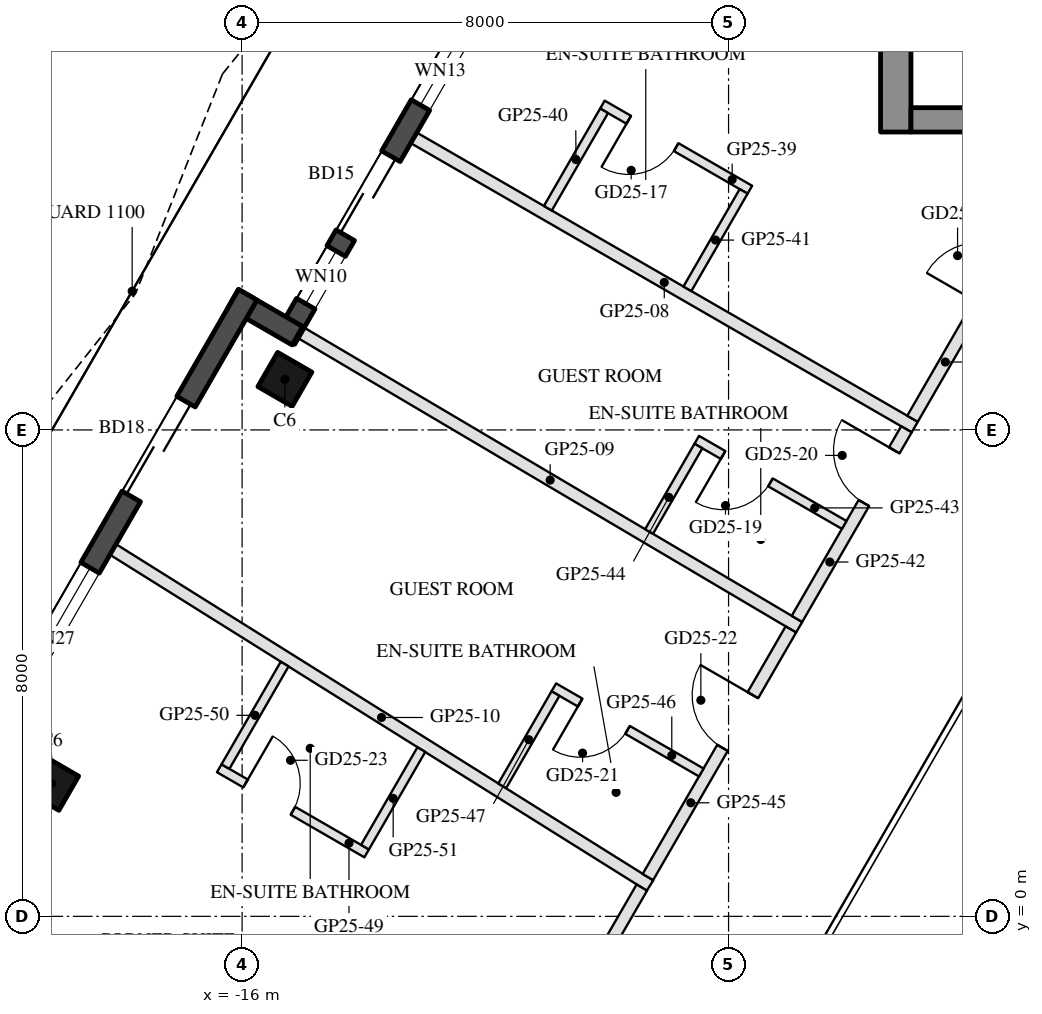
"""IFC4 building model, lengths in metres.
Left out: names, types, materials, properties, quantities, classifications, styles, units other than length and angle.
Written with IfcOpenShell. Run it as: python <this file> out.ifc"""

import sys

from ifc_helpers import new_model, si_unit, direction, frame, frame_2d, origin, origin_2d, place, context, subcontext, project, spatial, rectangle, hollow_rectangle, extrude, boolean, halfspace, element, fill, save


model = new_model("IFC4")
c1 = context("Model", 3, precision=1e-05, world=origin(), true_north=direction((0.0, 1.0)))
c2 = subcontext(c1, "Body", "Model", "MODEL_VIEW")
j1 = project(units=[si_unit("LENGTHUNIT", "METRE"), si_unit("PLANEANGLEUNIT", "RADIAN")], contexts=[c1])
p1 = place(None, origin())
s1 = spatial("IfcSite", under=j1, at=p1, CompositionType="ELEMENT")
p2 = place(p1, origin())
s2 = spatial("IfcBuilding", under=s1, at=p2, CompositionType="ELEMENT")
p3 = place(p2, frame((0.0, 0.0, 261.5)))
s3 = spatial("IfcBuildingStorey", under=s2, at=p3, CompositionType="ELEMENT", Elevation=261.5)
p4 = place(p3, frame((-15.296, 8.832, 0.0), z_axis=(0.0, 0.0, 1.0), x_axis=(0.5, 0.866025403784, 0.0)))
e1 = element("IfcColumn", 1, at=p4, inside=s3, PredefinedType="COLUMN", context=c2, shape_type="SweptSolid", body=[
    boolean("DIFFERENCE", extrude(hollow_rectangle(XDim=0.65, YDim=0.65, WallThickness=0.03, at=origin_2d()), origin(), (0.0, 0.0, 1.0), 3.7), halfspace(frame((0.0, 0.0, 3.663), z_axis=(0.0, 0.0, 1.0), x_axis=(1.0, 0.0, 0.0)), False)),
])
p5 = place(p3, frame((-19.132, 2.188, 0.0), z_axis=(0.0, 0.0, 1.0), x_axis=(0.5, 0.866025403784, 0.0)))
e2 = element("IfcColumn", 2, at=p5, inside=s3, PredefinedType="COLUMN", context=c2, shape_type="SweptSolid", body=[
    boolean("DIFFERENCE", extrude(hollow_rectangle(XDim=0.65, YDim=0.65, WallThickness=0.03, at=origin_2d()), origin(), (0.0, 0.0, 1.0), 3.7), halfspace(frame((0.0, 0.0, 3.66), z_axis=(0.0, 0.0, 1.0), x_axis=(1.0, 0.0, 0.0)), False)),
])
p6 = place(p3, frame((-12.032, 15.136, 0.0), z_axis=(0.0, 0.0, 1.0), x_axis=(-0.500005870429, -0.866022014464, 0.0)))
e3 = element("IfcWall", 3, at=p6, inside=s3, PredefinedType="SOLIDWALL", context=c2, shape_type="SweptSolid", body=[
    extrude(rectangle(XDim=6.512, YDim=0.35, at=frame_2d((3.256, 0.0))), origin(), (0.0, 0.0, 1.0), 3.55),
])
p7 = place(p6, frame((0.77, 0.0, 0.3)))
e4 = element("IfcOpeningElement", 4, at=p7, cuts=e3, PredefinedType="OPENING", context=c2, shape_type="SweptSolid", body=[
    extrude(rectangle(XDim=1.3, YDim=2.65, at=frame_2d((0.65, 1.325))), frame((0.0, 0.185, 0.0), z_axis=(0.0, -1.0, 0.0), x_axis=(1.0, 0.0, 0.0)), (0.0, 0.0, 1.0), 0.37),
])
p8 = place(p6, frame((3.042, 0.0, 0.0)))
e5 = element("IfcOpeningElement", 5, at=p8, cuts=e3, PredefinedType="OPENING", context=c2, shape_type="SweptSolid", body=[
    extrude(rectangle(XDim=1.5, YDim=2.4, at=frame_2d((0.75, 1.2))), frame((0.0, 0.185, 0.0), z_axis=(0.0, -1.0, 0.0), x_axis=(1.0, 0.0, 0.0)), (0.0, 0.0, 1.0), 0.37),
])
p9 = place(p6, frame((4.842, 0.0, 0.3)))
e6 = element("IfcOpeningElement", 6, at=p9, cuts=e3, PredefinedType="OPENING", context=c2, shape_type="SweptSolid", body=[
    extrude(rectangle(XDim=1.0, YDim=2.65, at=frame_2d((0.5, 1.325))), frame((0.0, 0.185, 0.0), z_axis=(0.0, -1.0, 0.0), x_axis=(1.0, 0.0, 0.0)), (0.0, 0.0, 1.0), 0.37),
])
p10 = place(p3, frame((-15.09, 9.549, 0.0), z_axis=(0.0, 0.0, 1.0), x_axis=(-0.866092288191, 0.499884134912, 0.0)))
e7 = element("IfcWall", 7, at=p10, inside=s3, PredefinedType="SOLIDWALL", context=c2, shape_type="SweptSolid", body=[
    extrude(rectangle(XDim=1.22, YDim=0.35, at=frame_2d((0.61, 0.0))), origin(), (0.0, 0.0, 1.0), 3.55),
])
p11 = place(p3, frame((-15.907, 10.223, 0.0), z_axis=(0.0, 0.0, 1.0), x_axis=(-0.499992427901, -0.866029775494, 0.0)))
e8 = element("IfcWall", 8, at=p11, inside=s3, PredefinedType="SOLIDWALL", context=c2, shape_type="SweptSolid", body=[
    extrude(rectangle(XDim=9.472, YDim=0.35, at=frame_2d((4.736, 0.0))), origin(), (0.0, 0.0, 1.0), 3.55),
])
p12 = place(p11, frame((2.03, 0.0, 0.0)))
e9 = element("IfcOpeningElement", 9, at=p12, cuts=e8, PredefinedType="OPENING", context=c2, shape_type="SweptSolid", body=[
    extrude(rectangle(XDim=1.8, YDim=2.4, at=frame_2d((0.9, 1.2))), frame((0.0, 0.185, 0.0), z_axis=(0.0, -1.0, 0.0), x_axis=(1.0, 0.0, 0.0)), (0.0, 0.0, 1.0), 0.37),
])
p13 = place(p11, frame((5.186, 0.0, 0.3)))
e10 = element("IfcOpeningElement", 10, at=p13, cuts=e8, PredefinedType="OPENING", context=c2, shape_type="SweptSolid", body=[
    extrude(rectangle(XDim=2.7, YDim=2.65, at=frame_2d((1.35, 1.325))), frame((0.0, 0.185, 0.0), z_axis=(0.0, -1.0, 0.0), x_axis=(1.0, 0.0, 0.0)), (0.0, 0.0, 1.0), 0.37),
])
p14 = place(p3, frame((-5.25, 12.9, 0.0), z_axis=(0.0, 0.0, 1.0), x_axis=(0.0, 1.0, 0.0)))
e11 = element("IfcWall", 11, at=p14, inside=s3, PredefinedType="SHEAR", context=c2, shape_type="SweptSolid", body=[
    extrude(rectangle(XDim=13.934, YDim=0.5, at=frame_2d((6.967, 0.0))), origin(), (0.0, 0.0, 1.0), 3.5),
])
p15 = place(p3, frame((5.0, 13.1, 0.0), z_axis=(0.0, 0.0, 1.0), x_axis=(-1.0, 0.0, 0.0)))
e12 = element("IfcWall", 12, at=p15, inside=s3, PredefinedType="SHEAR", context=c2, shape_type="SweptSolid", body=[
    extrude(rectangle(XDim=10.0, YDim=0.4, at=frame_2d((5.0, 0.0))), origin(), (0.0, 0.0, 1.0), 3.5),
])
p16 = place(p15, frame((3.55, 0.0, 0.0)))
e13 = element("IfcOpeningElement", 13, at=p16, cuts=e12, PredefinedType="OPENING", context=c2, shape_type="SweptSolid", body=[
    extrude(rectangle(XDim=1.1, YDim=2.1, at=frame_2d((0.55, 1.05))), frame((0.0, 0.21, 0.0), z_axis=(0.0, -1.0, 0.0), x_axis=(1.0, 0.0, 0.0)), (0.0, 0.0, 1.0), 0.42),
])
p17 = place(p15, frame((5.85, 0.0, 0.0)))
e14 = element("IfcOpeningElement", 14, at=p17, cuts=e12, PredefinedType="OPENING", context=c2, shape_type="SweptSolid", body=[
    extrude(rectangle(XDim=1.4, YDim=2.1, at=frame_2d((0.7, 1.05))), frame((0.0, 0.21, 0.0), z_axis=(0.0, -1.0, 0.0), x_axis=(1.0, 0.0, 0.0)), (0.0, 0.0, 1.0), 0.42),
])
p18 = place(p3, frame((-13.177, 12.804, 0.0), z_axis=(0.0, 0.0, 1.0), x_axis=(0.866021901412, -0.500006066238, 0.0)))
e15 = element("IfcWall", 15, at=p18, inside=s3, PredefinedType="PARTITIONING", context=c2, shape_type="SweptSolid", body=[
    extrude(rectangle(XDim=9.513, YDim=0.2, at=frame_2d((4.757, 0.0))), origin(), (0.0, 0.0, 1.0), 3.1),
])
p19 = place(p3, frame((-15.029, 9.596, 0.0), z_axis=(0.0, 0.0, 1.0), x_axis=(0.860830464323, -0.508891846754, 0.0)))
e16 = element("IfcWall", 16, at=p19, inside=s3, PredefinedType="PARTITIONING", context=c2, shape_type="SweptSolid", body=[
    extrude(rectangle(XDim=9.513, YDim=0.2, at=frame_2d((4.757, 0.0))), origin(), (0.0, 0.0, 1.0), 3.1),
])
p20 = place(p3, frame((-18.124, 6.034, 0.0), z_axis=(0.0, 0.0, 1.0), x_axis=(0.847667734063, -0.530527485271, 0.0)))
e17 = element("IfcWall", 17, at=p20, inside=s3, PredefinedType="PARTITIONING", context=c2, shape_type="SweptSolid", body=[
    extrude(rectangle(XDim=10.419, YDim=0.2, at=frame_2d((5.21, 0.0))), origin(), (0.0, 0.0, 1.0), 3.0),
])
p21 = place(p3, frame((-4.975, 8.184, 0.0), z_axis=(0.0, 0.0, 1.0), x_axis=(0.499983925036, 0.86603468447, 0.0)))
e18 = element("IfcWall", 18, at=p21, inside=s3, PredefinedType="PARTITIONING", context=c2, shape_type="SweptSolid", body=[
    extrude(rectangle(XDim=5.388, YDim=0.2, at=frame_2d((2.694, 0.0))), origin(), (0.0, 0.0, 1.0), 3.0),
])
p22 = place(p21, frame((2.194, 0.0, 0.0)))
e19 = element("IfcOpeningElement", 19, at=p22, cuts=e18, PredefinedType="OPENING", context=c2, shape_type="SweptSolid", body=[
    extrude(rectangle(XDim=1.0, YDim=2.1, at=frame_2d((0.5, 1.05))), frame((0.0, 0.11, 0.0), z_axis=(0.0, -1.0, 0.0), x_axis=(1.0, 0.0, 0.0)), (0.0, 0.0, 1.0), 0.22),
])
p23 = place(p3, frame((-7.649, 11.951, 0.0), z_axis=(0.0, 0.0, 1.0), x_axis=(-0.865996816683, 0.500049511043, 0.0)))
e20 = element("IfcWall", 20, at=p23, inside=s3, PredefinedType="PARTITIONING", context=c2, shape_type="SweptSolid", body=[
    extrude(rectangle(XDim=2.8, YDim=0.15, at=frame_2d((1.4, 0.0))), origin(), (0.0, 0.0, 1.0), 3.55),
])
p24 = place(p23, frame((1.4, 0.0, 0.0)))
e21 = element("IfcOpeningElement", 21, at=p24, cuts=e20, PredefinedType="OPENING", context=c2, shape_type="SweptSolid", body=[
    extrude(rectangle(XDim=0.9, YDim=2.1, at=frame_2d((0.45, 1.05))), frame((0.0, 0.085, 0.0), z_axis=(0.0, -1.0, 0.0), x_axis=(1.0, 0.0, 0.0)), (0.0, 0.0, 1.0), 0.17),
])
for number, where, z_axis, x_axis in (
    (22, (-10.047, 13.248, 0.0), (0.0, 0.0, 1.0), (-0.5, -0.866, 0.0)),
    (23, (-7.752, 11.923, 0.0), (0.0, 0.0, 1.0), (-0.5, -0.866, 0.0)),
):
    element("IfcWall", number, at=place(p3, frame(where, z_axis=z_axis, x_axis=x_axis)), inside=s3, PredefinedType="PARTITIONING", context=c2, shape_type="SweptSolid", body=[
        extrude(rectangle(XDim=1.85, YDim=0.15, at=frame_2d((0.925, 0.0))), origin(), (0.0, 0.0, 1.0), 3.55),
    ])
p25 = place(p3, frame((-6.875, 4.892, 0.0), z_axis=(0.0, 0.0, 1.0), x_axis=(0.499945471869, 0.866056883327, 0.0)))
e24 = element("IfcWall", 24, at=p25, inside=s3, PredefinedType="PARTITIONING", context=c2, shape_type="SweptSolid", body=[
    extrude(rectangle(XDim=3.601, YDim=0.2, at=frame_2d((1.801, 0.0))), origin(), (0.0, 0.0, 1.0), 3.0),
])
p26 = place(p25, frame((2.201, 0.0, 0.0)))
e25 = element("IfcOpeningElement", 25, at=p26, cuts=e24, PredefinedType="OPENING", context=c2, shape_type="SweptSolid", body=[
    extrude(rectangle(XDim=1.0, YDim=2.1, at=frame_2d((0.5, 1.05))), frame((0.0, 0.11, 0.0), z_axis=(0.0, -1.0, 0.0), x_axis=(1.0, 0.0, 0.0)), (0.0, 0.0, 1.0), 0.22),
])
p27 = place(p3, frame((-6.098, 6.438, 0.0), z_axis=(0.0, 0.0, 1.0), x_axis=(-0.866018616679, 0.500011755427, 0.0)))
e26 = element("IfcWall", 26, at=p27, inside=s3, PredefinedType="PARTITIONING", context=c2, shape_type="SweptSolid", body=[
    extrude(rectangle(XDim=2.8, YDim=0.15, at=frame_2d((1.4, 0.0))), origin(), (0.0, 0.0, 1.0), 3.55),
])
p28 = place(p27, frame((1.4, 0.0, 0.0)))
e27 = element("IfcOpeningElement", 27, at=p28, cuts=e26, PredefinedType="OPENING", context=c2, shape_type="SweptSolid", body=[
    extrude(rectangle(XDim=0.9, YDim=2.1, at=frame_2d((0.45, 1.05))), frame((0.0, 0.085, 0.0), z_axis=(0.0, -1.0, 0.0), x_axis=(1.0, 0.0, 0.0)), (0.0, 0.0, 1.0), 0.17),
])
p29 = place(p3, frame((-8.496, 7.735, 0.0), z_axis=(0.0, 0.0, 1.0), x_axis=(-0.500021943523, -0.866012734315, 0.0)))
e28 = element("IfcWall", 28, at=p29, inside=s3, PredefinedType="PARTITIONING", context=c2, shape_type="SweptSolid", body=[
    extrude(rectangle(XDim=1.623, YDim=0.15, at=frame_2d((0.812, 0.0))), origin(), (0.0, 0.0, 1.0), 3.55),
])
p30 = place(p3, frame((-9.326, 0.646, 0.0), z_axis=(0.0, 0.0, 1.0), x_axis=(0.500008572427, 0.866020454435, 0.0)))
e29 = element("IfcWall", 29, at=p30, inside=s3, PredefinedType="PARTITIONING", context=c2, shape_type="SweptSolid", body=[
    extrude(rectangle(XDim=4.703, YDim=0.2, at=frame_2d((2.351, 0.0))), origin(), (0.0, 0.0, 1.0), 3.0),
])
p31 = place(p30, frame((2.454, 0.0, 0.0)))
e30 = element("IfcOpeningElement", 30, at=p31, cuts=e29, PredefinedType="OPENING", context=c2, shape_type="SweptSolid", body=[
    extrude(rectangle(XDim=1.0, YDim=2.1, at=frame_2d((0.5, 1.05))), frame((0.0, 0.11, 0.0), z_axis=(0.0, -1.0, 0.0), x_axis=(1.0, 0.0, 0.0)), (0.0, 0.0, 1.0), 0.22),
])
p32 = place(p3, frame((-8.449, 2.366, 0.0), z_axis=(0.0, 0.0, 1.0), x_axis=(-0.866034573852, 0.49998411664, 0.0)))
e31 = element("IfcWall", 31, at=p32, inside=s3, PredefinedType="PARTITIONING", context=c2, shape_type="SweptSolid", body=[
    extrude(rectangle(XDim=2.8, YDim=0.15, at=frame_2d((1.4, 0.0))), origin(), (0.0, 0.0, 1.0), 3.55),
])
p33 = place(p32, frame((1.4, 0.0, 0.0)))
e32 = element("IfcOpeningElement", 32, at=p33, cuts=e31, PredefinedType="OPENING", context=c2, shape_type="SweptSolid", body=[
    extrude(rectangle(XDim=0.9, YDim=2.1, at=frame_2d((0.45, 1.05))), frame((0.0, 0.085, 0.0), z_axis=(0.0, -1.0, 0.0), x_axis=(1.0, 0.0, 0.0)), (0.0, 0.0, 1.0), 0.17),
])
p34 = place(p3, frame((-10.846, 3.664, 0.0), z_axis=(0.0, 0.0, 1.0), x_axis=(-0.499899295206, -0.866083537918, 0.0)))
e33 = element("IfcWall", 33, at=p34, inside=s3, PredefinedType="PARTITIONING", context=c2, shape_type="SweptSolid", body=[
    extrude(rectangle(XDim=1.753, YDim=0.15, at=frame_2d((0.876, 0.0))), origin(), (0.0, 0.0, 1.0), 3.0),
])
p35 = place(p3, frame((-12.269, -4.45, 0.0), z_axis=(0.0, 0.0, 1.0), x_axis=(0.500009958894, 0.866019653938, 0.0)))
e34 = element("IfcWall", 34, at=p35, inside=s3, PredefinedType="PARTITIONING", context=c2, shape_type="SweptSolid", body=[
    extrude(rectangle(XDim=5.685, YDim=0.2, at=frame_2d((2.842, 0.0))), origin(), (0.0, 0.0, 1.0), 3.0),
])
p36 = place(p35, frame((2.342, 0.0, 0.0)))
e35 = element("IfcOpeningElement", 35, at=p36, cuts=e34, PredefinedType="OPENING", context=c2, shape_type="SweptSolid", body=[
    extrude(rectangle(XDim=1.0, YDim=2.1, at=frame_2d((0.5, 1.05))), frame((0.0, 0.11, 0.0), z_axis=(0.0, -1.0, 0.0), x_axis=(1.0, 0.0, 0.0)), (0.0, 0.0, 1.0), 0.22),
])
p37 = place(p3, frame((-16.376, 2.436, 0.0), z_axis=(0.0, 0.0, 1.0), x_axis=(0.865996816683, -0.500049511043, 0.0)))
e36 = element("IfcWall", 36, at=p37, inside=s3, PredefinedType="PARTITIONING", context=c2, shape_type="SweptSolid", body=[
    extrude(rectangle(XDim=2.8, YDim=0.15, at=frame_2d((1.4, 0.0))), origin(), (0.0, 0.0, 1.0), 3.55),
])
p38 = place(p37, frame((0.5, 0.0, 0.0)))
e37 = element("IfcOpeningElement", 37, at=p38, cuts=e36, PredefinedType="OPENING", context=c2, shape_type="SweptSolid", body=[
    extrude(rectangle(XDim=0.9, YDim=2.1, at=frame_2d((0.45, 1.05))), frame((0.0, 0.085, 0.0), z_axis=(0.0, -1.0, 0.0), x_axis=(1.0, 0.0, 0.0)), (0.0, 0.0, 1.0), 0.17),
])
p39 = place(p3, frame((-15.3, 4.149, 0.0), z_axis=(0.0, 0.0, 1.0), x_axis=(-0.49987439993, -0.866097906876, 0.0)))
e38 = element("IfcWall", 38, at=p39, inside=s3, PredefinedType="PARTITIONING", context=c2, shape_type="SweptSolid", body=[
    extrude(rectangle(XDim=1.947, YDim=0.15, at=frame_2d((0.974, 0.0))), origin(), (0.0, 0.0, 1.0), 3.55),
])
p40 = place(p3, frame((-13.052, 2.742, 0.0), z_axis=(0.0, 0.0, 1.0), x_axis=(-0.499965806267, -0.866045144646, 0.0)))
e39 = element("IfcWall", 39, at=p40, inside=s3, PredefinedType="PARTITIONING", context=c2, shape_type="SweptSolid", body=[
    extrude(rectangle(XDim=1.853, YDim=0.15, at=frame_2d((0.926, 0.0))), origin(), (0.0, 0.0, 1.0), 3.55),
])
p41 = place(p7, origin())
e40 = element("IfcWindow", 40, at=p41, inside=s3, PartitioningType="SINGLE_PANEL", PredefinedType="WINDOW", context=c2, shape_type="SweptSolid", body=[
    extrude(rectangle(XDim=1.3, YDim=2.65, at=frame_2d((0.65, 1.325))), frame((0.0, 0.03, 0.0), z_axis=(0.0, -1.0, 0.0), x_axis=(1.0, 0.0, 0.0)), (0.0, 0.0, 1.0), 0.06),
])
fill(e4, e40)
p42 = place(p8, frame((1.5, 0.0, 0.0), z_axis=(0.0, 0.0, 1.0), x_axis=(-1.0, 0.0, 0.0)))
e41 = element("IfcDoor", 41, at=p42, inside=s3, OperationType="SLIDING_TO_LEFT", PredefinedType="DOOR", context=c2, shape_type="SweptSolid", body=[
    extrude(rectangle(XDim=1.5, YDim=2.4, at=frame_2d((0.75, 1.2))), frame((0.0, 0.025, 0.0), z_axis=(0.0, -1.0, 0.0), x_axis=(1.0, 0.0, 0.0)), (0.0, 0.0, 1.0), 0.05),
])
fill(e5, e41)
p43 = place(p9, origin())
e42 = element("IfcWindow", 42, at=p43, inside=s3, PartitioningType="SINGLE_PANEL", PredefinedType="WINDOW", context=c2, shape_type="SweptSolid", body=[
    extrude(rectangle(XDim=1.0, YDim=2.65, at=frame_2d((0.5, 1.325))), frame((0.0, 0.03, 0.0), z_axis=(0.0, -1.0, 0.0), x_axis=(1.0, 0.0, 0.0)), (0.0, 0.0, 1.0), 0.06),
])
fill(e6, e42)
p44 = place(p12, frame((1.8, 0.0, 0.0), z_axis=(0.0, 0.0, 1.0), x_axis=(-1.0, 0.0, 0.0)))
e43 = element("IfcDoor", 43, at=p44, inside=s3, OperationType="SLIDING_TO_LEFT", PredefinedType="DOOR", context=c2, shape_type="SweptSolid", body=[
    extrude(rectangle(XDim=1.8, YDim=2.4, at=frame_2d((0.9, 1.2))), frame((0.0, 0.025, 0.0), z_axis=(0.0, -1.0, 0.0), x_axis=(1.0, 0.0, 0.0)), (0.0, 0.0, 1.0), 0.05),
])
fill(e9, e43)
p45 = place(p13, origin())
e44 = element("IfcWindow", 44, at=p45, inside=s3, PartitioningType="SINGLE_PANEL", PredefinedType="WINDOW", context=c2, shape_type="SweptSolid", body=[
    extrude(rectangle(XDim=2.7, YDim=2.65, at=frame_2d((1.35, 1.325))), frame((0.0, 0.03, 0.0), z_axis=(0.0, -1.0, 0.0), x_axis=(1.0, 0.0, 0.0)), (0.0, 0.0, 1.0), 0.06),
])
fill(e10, e44)
p46 = place(p24, origin())
e45 = element("IfcDoor", 45, at=p46, inside=s3, OperationType="SINGLE_SWING_RIGHT", PredefinedType="DOOR", context=c2, shape_type="SweptSolid", body=[
    extrude(rectangle(XDim=0.9, YDim=2.1, at=frame_2d((0.45, 1.05))), frame((0.0, 0.025, 0.0), z_axis=(0.0, -1.0, 0.0), x_axis=(1.0, 0.0, 0.0)), (0.0, 0.0, 1.0), 0.05),
])
fill(e21, e45)
p47 = place(p28, origin())
e46 = element("IfcDoor", 46, at=p47, inside=s3, OperationType="SINGLE_SWING_RIGHT", PredefinedType="DOOR", context=c2, shape_type="SweptSolid", body=[
    extrude(rectangle(XDim=0.9, YDim=2.1, at=frame_2d((0.45, 1.05))), frame((0.0, 0.025, 0.0), z_axis=(0.0, -1.0, 0.0), x_axis=(1.0, 0.0, 0.0)), (0.0, 0.0, 1.0), 0.05),
])
fill(e27, e46)
p48 = place(p26, origin())
e47 = element("IfcDoor", 47, at=p48, inside=s3, OperationType="SINGLE_SWING_RIGHT", PredefinedType="DOOR", context=c2, shape_type="SweptSolid", body=[
    extrude(rectangle(XDim=1.0, YDim=2.1, at=frame_2d((0.5, 1.05))), frame((0.0, 0.025, 0.0), z_axis=(0.0, -1.0, 0.0), x_axis=(1.0, 0.0, 0.0)), (0.0, 0.0, 1.0), 0.05),
])
fill(e25, e47)
p49 = place(p33, origin())
e48 = element("IfcDoor", 48, at=p49, inside=s3, OperationType="SINGLE_SWING_RIGHT", PredefinedType="DOOR", context=c2, shape_type="SweptSolid", body=[
    extrude(rectangle(XDim=0.9, YDim=2.1, at=frame_2d((0.45, 1.05))), frame((0.0, 0.025, 0.0), z_axis=(0.0, -1.0, 0.0), x_axis=(1.0, 0.0, 0.0)), (0.0, 0.0, 1.0), 0.05),
])
fill(e32, e48)
p50 = place(p31, origin())
e49 = element("IfcDoor", 49, at=p50, inside=s3, OperationType="SINGLE_SWING_RIGHT", PredefinedType="DOOR", context=c2, shape_type="SweptSolid", body=[
    extrude(rectangle(XDim=1.0, YDim=2.1, at=frame_2d((0.5, 1.05))), frame((0.0, 0.025, 0.0), z_axis=(0.0, -1.0, 0.0), x_axis=(1.0, 0.0, 0.0)), (0.0, 0.0, 1.0), 0.05),
])
fill(e30, e49)
p51 = place(p38, origin())
e50 = element("IfcDoor", 50, at=p51, inside=s3, OperationType="SINGLE_SWING_LEFT", PredefinedType="DOOR", context=c2, shape_type="SweptSolid", body=[
    extrude(rectangle(XDim=0.9, YDim=2.1, at=frame_2d((0.45, 1.05))), frame((0.0, 0.025, 0.0), z_axis=(0.0, -1.0, 0.0), x_axis=(1.0, 0.0, 0.0)), (0.0, 0.0, 1.0), 0.05),
])
fill(e37, e50)
save(model, sys.argv[1])
